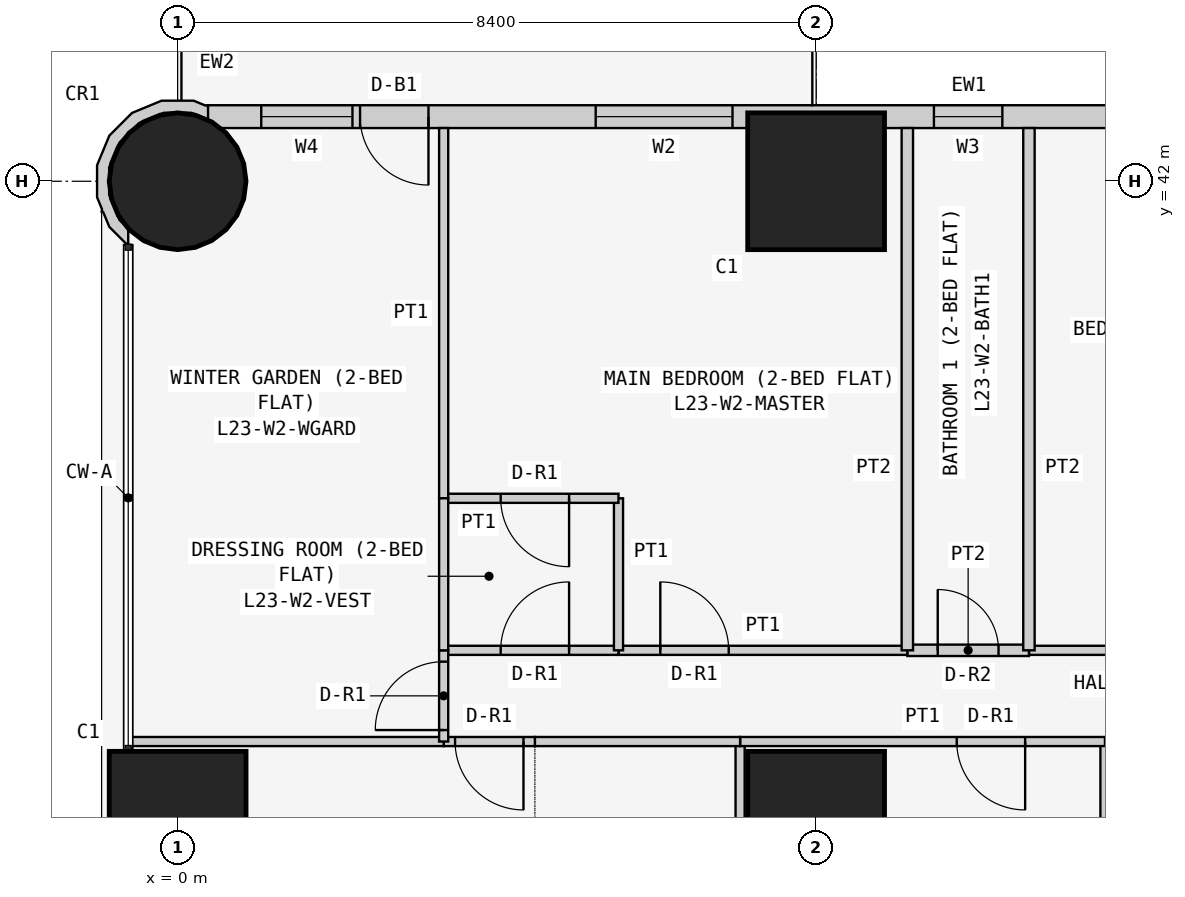
"""IFC4 building model, lengths in metres.
Left out: names, types, materials, properties, quantities, classifications, styles, units other than length and angle.
Written with IfcOpenShell. Run it as: python <this file> out.ifc"""

import sys

from ifc_helpers import new_model, si_unit, direction, frame, frame_2d, origin, origin_2d, place, context, subcontext, project, spatial, polyline, rectangle, circle, outline, extrude, element, fill, save


model = new_model("IFC4")
c1 = context("Model", 3, precision=1e-05, world=origin(), true_north=direction((0.0, 1.0)))
c2 = subcontext(c1, "Body", "Model", "MODEL_VIEW")
j1 = project(units=[si_unit("LENGTHUNIT", "METRE"), si_unit("PLANEANGLEUNIT", "RADIAN")], contexts=[c1])
p1 = place(None, origin())
s1 = spatial("IfcSite", under=j1, at=p1, CompositionType="ELEMENT")
p2 = place(p1, origin())
s2 = spatial("IfcBuilding", under=s1, at=p2, CompositionType="ELEMENT")
p3 = place(p2, frame((0.0, 0.0, 92.1)))
s3 = spatial("IfcBuildingStorey", under=s2, at=p3, CompositionType="ELEMENT", Elevation=92.1)
p4 = place(p3, frame((0.0, 33.6, 0.0), z_axis=(0.0, 0.0, 1.0), x_axis=(1.0, 0.0, 0.0)))
e1 = element("IfcColumn", 1, at=p4, inside=s3, PredefinedType="COLUMN", context=c2, shape_type="SweptSolid", body=[
    extrude(rectangle(XDim=1.8, YDim=1.8, at=origin_2d()), origin(), (0.0, 0.0, 1.0), 3.6),
])
p5 = place(p3, frame((0.0, 42.0, 0.0), z_axis=(0.0, 0.0, 1.0), x_axis=(1.0, 0.0, 0.0)))
e2 = element("IfcColumn", 2, at=p5, inside=s3, PredefinedType="COLUMN", context=c2, shape_type="SweptSolid", body=[
    extrude(circle(Radius=0.9, at=origin_2d()), origin(), (0.0, 0.0, 1.0), 3.6),
])
for number, where, z_axis, x_axis in (
    (3, (8.4, 33.6, 0.0), (0.0, 0.0, 1.0), (1.0, 0.0, 0.0)),
    (4, (8.4, 42.0, 0.0), (0.0, 0.0, 1.0), (1.0, 0.0, 0.0)),
):
    element("IfcColumn", number, at=place(p3, frame(where, z_axis=z_axis, x_axis=x_axis)), inside=s3, PredefinedType="COLUMN", context=c2, shape_type="SweptSolid", body=[
        extrude(rectangle(XDim=1.8, YDim=1.8, at=origin_2d()), origin(), (0.0, 0.0, 1.0), 3.6),
    ])
p6 = place(p3, frame((15.8, 42.85, 0.0), z_axis=(0.0, 0.0, 1.0), x_axis=(-1.0, 0.0, 0.0)))
e5 = element("IfcWall", 5, at=p6, inside=s3, PredefinedType="SOLIDWALL", context=c2, shape_type="SweptSolid", body=[
    extrude(rectangle(XDim=15.4, YDim=0.3, at=frame_2d((7.7, 0.0))), origin(), (0.0, 0.0, 1.0), 3.45),
])
p7 = place(p6, frame((1.2, 0.0, 0.9)))
e6 = element("IfcOpeningElement", 6, at=p7, cuts=e5, PredefinedType="OPENING", context=c2, shape_type="SweptSolid", body=[
    extrude(rectangle(XDim=1.8, YDim=1.5, at=frame_2d((0.9, 0.75))), frame((0.0, 0.16, 0.0), z_axis=(0.0, -1.0, 0.0), x_axis=(1.0, 0.0, 0.0)), (0.0, 0.0, 1.0), 0.32),
])
p8 = place(p6, frame((4.95, 0.0, 1.5)))
e7 = element("IfcOpeningElement", 7, at=p8, cuts=e5, PredefinedType="OPENING", context=c2, shape_type="SweptSolid", body=[
    extrude(rectangle(XDim=0.9, YDim=0.7, at=frame_2d((0.45, 0.35))), frame((0.0, 0.16, 0.0), z_axis=(0.0, -1.0, 0.0), x_axis=(1.0, 0.0, 0.0)), (0.0, 0.0, 1.0), 0.32),
])
p9 = place(p6, frame((8.5, 0.0, 0.9)))
e8 = element("IfcOpeningElement", 8, at=p9, cuts=e5, PredefinedType="OPENING", context=c2, shape_type="SweptSolid", body=[
    extrude(rectangle(XDim=1.8, YDim=1.5, at=frame_2d((0.9, 0.75))), frame((0.0, 0.16, 0.0), z_axis=(0.0, -1.0, 0.0), x_axis=(1.0, 0.0, 0.0)), (0.0, 0.0, 1.0), 0.32),
])
p10 = place(p6, frame((12.5, 0.0, 0.0)))
e9 = element("IfcOpeningElement", 9, at=p10, cuts=e5, PredefinedType="OPENING", context=c2, shape_type="SweptSolid", body=[
    extrude(rectangle(XDim=0.9, YDim=2.4, at=frame_2d((0.45, 1.2))), frame((0.0, 0.16, 0.0), z_axis=(0.0, -1.0, 0.0), x_axis=(1.0, 0.0, 0.0)), (0.0, 0.0, 1.0), 0.32),
])
p11 = place(p6, frame((13.5, 0.0, 0.9)))
e10 = element("IfcOpeningElement", 10, at=p11, cuts=e5, PredefinedType="OPENING", context=c2, shape_type="SweptSolid", body=[
    extrude(rectangle(XDim=1.2, YDim=1.5, at=frame_2d((0.6, 0.75))), frame((0.0, 0.16, 0.0), z_axis=(0.0, -1.0, 0.0), x_axis=(1.0, 0.0, 0.0)), (0.0, 0.0, 1.0), 0.32),
])
p12 = place(p3, frame((0.364, 42.91, 0.0), z_axis=(0.0, 0.0, 1.0), x_axis=(-0.926129809145, 0.377204953059, 0.0)))
e11 = element("IfcWall", 11, at=p12, inside=s3, PredefinedType="SOLIDWALL", context=c2, shape_type="SweptSolid", body=[
    extrude(outline(polyline([(0.36, 1.803), (0.509, 1.741), (0.761, 1.486), (0.896, 1.154), (0.894, 0.795), (0.755, 0.465), (0.5, 0.213), (0.168, 0.078), (-0.1, 0.08), (0.001, -0.097), (0.03, -0.08), (0.199, -0.081), (0.589, 0.078), (0.889, 0.374), (1.053, 0.763), (1.055, 1.185), (0.896, 1.575), (0.778, 1.695), (0.769, 1.728), (0.75, 1.723), (0.6, 1.875), (0.295, 2.003), (0.281, 1.998), (0.36, 1.803)])), origin(), (0.0, 0.0, 1.0), 3.45),
])
for number, where, z_axis, x_axis in (
    (12, (12.2, 29.4, 0.0), (0.0, 0.0, 1.0), (0.0, 1.0, 0.0)),
    (13, (7.4, 29.4, 0.0), (0.0, 0.0, 1.0), (0.0, 1.0, 0.0)),
):
    element("IfcWall", number, at=place(p3, frame(where, z_axis=z_axis, x_axis=x_axis)), inside=s3, PredefinedType="PARTITIONING", context=c2, shape_type="SweptSolid", body=[
        extrude(rectangle(XDim=5.229, YDim=0.12, at=frame_2d((2.615, 0.0))), origin(), (0.0, 0.0, 1.0), 3.45),
    ])
p13 = place(p3, frame((7.4, 34.629, 0.0), z_axis=(0.0, 0.0, 1.0), x_axis=(1.0, 0.0, 0.0)))
e14 = element("IfcWall", 14, at=p13, inside=s3, PredefinedType="PARTITIONING", context=c2, shape_type="SweptSolid", body=[
    extrude(rectangle(XDim=4.8, YDim=0.12, at=frame_2d((2.4, 0.0))), origin(), (0.0, 0.0, 1.0), 3.45),
])
p14 = place(p13, frame((2.85, 0.0, 0.0)))
e15 = element("IfcOpeningElement", 15, at=p14, cuts=e14, PredefinedType="OPENING", context=c2, shape_type="SweptSolid", body=[
    extrude(rectangle(XDim=0.9, YDim=2.1, at=frame_2d((0.45, 1.05))), frame((0.0, 0.07, 0.0), z_axis=(0.0, -1.0, 0.0), x_axis=(1.0, 0.0, 0.0)), (0.0, 0.0, 1.0), 0.14),
])
p15 = place(p3, frame((4.7, 34.629, 0.0), z_axis=(0.0, 0.0, 1.0), x_axis=(1.0, 0.0, 0.0)))
e16 = element("IfcWall", 16, at=p15, inside=s3, PredefinedType="PARTITIONING", context=c2, shape_type="SweptSolid", body=[
    extrude(rectangle(XDim=2.7, YDim=0.12, at=frame_2d((1.35, 0.0))), origin(), (0.0, 0.0, 1.0), 3.45),
])
p16 = place(p3, frame((3.5, 34.629, 0.0), z_axis=(0.0, 0.0, 1.0), x_axis=(1.0, 0.0, 0.0)))
e17 = element("IfcWall", 17, at=p16, inside=s3, PredefinedType="PARTITIONING", context=c2, shape_type="SweptSolid", body=[
    extrude(rectangle(XDim=1.2, YDim=0.12, at=frame_2d((0.6, 0.0))), origin(), (0.0, 0.0, 1.0), 3.45),
])
p17 = place(p16, frame((0.15, 0.0, 0.0)))
e18 = element("IfcOpeningElement", 18, at=p17, cuts=e17, PredefinedType="OPENING", context=c2, shape_type="SweptSolid", body=[
    extrude(rectangle(XDim=0.9, YDim=2.1, at=frame_2d((0.45, 1.05))), frame((0.0, 0.07, 0.0), z_axis=(0.0, -1.0, 0.0), x_axis=(1.0, 0.0, 0.0)), (0.0, 0.0, 1.0), 0.14),
])
p18 = place(p3, frame((-0.65, 34.629, 0.0), z_axis=(0.0, 0.0, 1.0), x_axis=(1.0, 0.0, 0.0)))
e19 = element("IfcWall", 19, at=p18, inside=s3, PredefinedType="PARTITIONING", context=c2, shape_type="SweptSolid", body=[
    extrude(rectangle(XDim=4.15, YDim=0.12, at=frame_2d((2.075, 0.0))), origin(), (0.0, 0.0, 1.0), 3.45),
])
p19 = place(p3, frame((11.2, 35.829, 0.0), z_axis=(0.0, 0.0, 1.0), x_axis=(1.0, 0.0, 0.0)))
e20 = element("IfcWall", 20, at=p19, inside=s3, PredefinedType="PARTITIONING", context=c2, shape_type="SweptSolid", body=[
    extrude(rectangle(XDim=4.575, YDim=0.12, at=frame_2d((2.288, 0.0))), origin(), (0.0, 0.0, 1.0), 3.45),
])
p20 = place(p19, frame((1.85, 0.0, 0.0)))
e21 = element("IfcOpeningElement", 21, at=p20, cuts=e20, PredefinedType="OPENING", context=c2, shape_type="SweptSolid", body=[
    extrude(rectangle(XDim=0.9, YDim=2.1, at=frame_2d((0.45, 1.05))), frame((0.0, 0.07, 0.0), z_axis=(0.0, -1.0, 0.0), x_axis=(1.0, 0.0, 0.0)), (0.0, 0.0, 1.0), 0.14),
])
p21 = place(p3, frame((9.6, 35.829, 0.0), z_axis=(0.0, 0.0, 1.0), x_axis=(1.0, 0.0, 0.0)))
e22 = element("IfcWall", 22, at=p21, inside=s3, PredefinedType="PARTITIONING", context=c2, shape_type="SweptSolid", body=[
    extrude(rectangle(XDim=1.6, YDim=0.15, at=frame_2d((0.8, 0.0))), origin(), (0.0, 0.0, 1.0), 3.45),
])
p22 = place(p21, frame((0.4, 0.0, 0.0)))
e23 = element("IfcOpeningElement", 23, at=p22, cuts=e22, PredefinedType="OPENING", context=c2, shape_type="SweptSolid", body=[
    extrude(rectangle(XDim=0.8, YDim=2.1, at=frame_2d((0.4, 1.05))), frame((0.0, 0.085, 0.0), z_axis=(0.0, -1.0, 0.0), x_axis=(1.0, 0.0, 0.0)), (0.0, 0.0, 1.0), 0.17),
])
p23 = place(p3, frame((5.8, 35.829, 0.0), z_axis=(0.0, 0.0, 1.0), x_axis=(1.0, 0.0, 0.0)))
e24 = element("IfcWall", 24, at=p23, inside=s3, PredefinedType="PARTITIONING", context=c2, shape_type="SweptSolid", body=[
    extrude(rectangle(XDim=3.8, YDim=0.12, at=frame_2d((1.9, 0.0))), origin(), (0.0, 0.0, 1.0), 3.45),
])
p24 = place(p23, frame((0.55, 0.0, 0.0)))
e25 = element("IfcOpeningElement", 25, at=p24, cuts=e24, PredefinedType="OPENING", context=c2, shape_type="SweptSolid", body=[
    extrude(rectangle(XDim=0.9, YDim=2.1, at=frame_2d((0.45, 1.05))), frame((0.0, 0.07, 0.0), z_axis=(0.0, -1.0, 0.0), x_axis=(1.0, 0.0, 0.0)), (0.0, 0.0, 1.0), 0.14),
])
p25 = place(p3, frame((3.5, 35.829, 0.0), z_axis=(0.0, 0.0, 1.0), x_axis=(1.0, 0.0, 0.0)))
e26 = element("IfcWall", 26, at=p25, inside=s3, PredefinedType="PARTITIONING", context=c2, shape_type="SweptSolid", body=[
    extrude(rectangle(XDim=2.3, YDim=0.12, at=frame_2d((1.15, 0.0))), origin(), (0.0, 0.0, 1.0), 3.45),
])
p26 = place(p25, frame((0.75, 0.0, 0.0)))
e27 = element("IfcOpeningElement", 27, at=p26, cuts=e26, PredefinedType="OPENING", context=c2, shape_type="SweptSolid", body=[
    extrude(rectangle(XDim=0.9, YDim=2.1, at=frame_2d((0.45, 1.05))), frame((0.0, 0.07, 0.0), z_axis=(0.0, -1.0, 0.0), x_axis=(1.0, 0.0, 0.0)), (0.0, 0.0, 1.0), 0.14),
])
p27 = place(p3, frame((3.5, 34.629, 0.0), z_axis=(0.0, 0.0, 1.0), x_axis=(0.0, 1.0, 0.0)))
e28 = element("IfcWall", 28, at=p27, inside=s3, PredefinedType="PARTITIONING", context=c2, shape_type="SweptSolid", body=[
    extrude(rectangle(XDim=1.2, YDim=0.12, at=frame_2d((0.6, 0.0))), origin(), (0.0, 0.0, 1.0), 3.45),
])
p28 = place(p27, frame((0.151, 0.0, 0.0)))
e29 = element("IfcOpeningElement", 29, at=p28, cuts=e28, PredefinedType="OPENING", context=c2, shape_type="SweptSolid", body=[
    extrude(rectangle(XDim=0.9, YDim=2.1, at=frame_2d((0.45, 1.05))), frame((0.0, 0.07, 0.0), z_axis=(0.0, -1.0, 0.0), x_axis=(1.0, 0.0, 0.0)), (0.0, 0.0, 1.0), 0.14),
])
for number, where, z_axis, x_axis in (
    (30, (11.2, 35.829, 0.0), (0.0, 0.0, 1.0), (0.0, 1.0, 0.0)),
    (31, (9.6, 35.829, 0.0), (0.0, 0.0, 1.0), (0.0, 1.0, 0.0)),
):
    element("IfcWall", number, at=place(p3, frame(where, z_axis=z_axis, x_axis=x_axis)), inside=s3, PredefinedType="PARTITIONING", context=c2, shape_type="SweptSolid", body=[
        extrude(rectangle(XDim=6.871, YDim=0.15, at=frame_2d((3.436, 0.0))), origin(), (0.0, 0.0, 1.0), 3.45),
    ])
p29 = place(p3, frame((5.8, 35.829, 0.0), z_axis=(0.0, 0.0, 1.0), x_axis=(0.0, 1.0, 0.0)))
e32 = element("IfcWall", 32, at=p29, inside=s3, PredefinedType="PARTITIONING", context=c2, shape_type="SweptSolid", body=[
    extrude(rectangle(XDim=2.0, YDim=0.12, at=frame_2d((1.0, 0.0))), origin(), (0.0, 0.0, 1.0), 3.45),
])
p30 = place(p3, frame((5.8, 37.829, 0.0), z_axis=(0.0, 0.0, 1.0), x_axis=(-1.0, 0.0, 0.0)))
e33 = element("IfcWall", 33, at=p30, inside=s3, PredefinedType="PARTITIONING", context=c2, shape_type="SweptSolid", body=[
    extrude(rectangle(XDim=2.3, YDim=0.12, at=frame_2d((1.15, 0.0))), origin(), (0.0, 0.0, 1.0), 3.45),
])
p31 = place(p30, frame((0.65, 0.0, 0.0)))
e34 = element("IfcOpeningElement", 34, at=p31, cuts=e33, PredefinedType="OPENING", context=c2, shape_type="SweptSolid", body=[
    extrude(rectangle(XDim=0.9, YDim=2.1, at=frame_2d((0.45, 1.05))), frame((0.0, 0.07, 0.0), z_axis=(0.0, -1.0, 0.0), x_axis=(1.0, 0.0, 0.0)), (0.0, 0.0, 1.0), 0.14),
])
p32 = place(p3, frame((3.5, 37.829, 0.0), z_axis=(0.0, 0.0, 1.0), x_axis=(0.0, 1.0, 0.0)))
e35 = element("IfcWall", 35, at=p32, inside=s3, PredefinedType="PARTITIONING", context=c2, shape_type="SweptSolid", body=[
    extrude(rectangle(XDim=4.871, YDim=0.12, at=frame_2d((2.436, 0.0))), origin(), (0.0, 0.0, 1.0), 3.45),
])
p33 = place(p3, frame((3.5, 35.829, 0.0), z_axis=(0.0, 0.0, 1.0), x_axis=(0.0, 1.0, 0.0)))
e36 = element("IfcWall", 36, at=p33, inside=s3, PredefinedType="PARTITIONING", context=c2, shape_type="SweptSolid", body=[
    extrude(rectangle(XDim=2.0, YDim=0.12, at=frame_2d((1.0, 0.0))), origin(), (0.0, 0.0, 1.0), 3.45),
])
p34 = place(p8, origin())
e37 = element("IfcWindow", 37, at=p34, inside=s3, PartitioningType="SINGLE_PANEL", PredefinedType="WINDOW", context=c2, shape_type="SweptSolid", body=[
    extrude(rectangle(XDim=0.9, YDim=0.7, at=frame_2d((0.45, 0.35))), frame((0.0, 0.03, 0.0), z_axis=(0.0, -1.0, 0.0), x_axis=(1.0, 0.0, 0.0)), (0.0, 0.0, 1.0), 0.06),
])
fill(e7, e37)
p35 = place(p9, origin())
e38 = element("IfcWindow", 38, at=p35, inside=s3, PartitioningType="SINGLE_PANEL", PredefinedType="WINDOW", context=c2, shape_type="SweptSolid", body=[
    extrude(rectangle(XDim=1.8, YDim=1.5, at=frame_2d((0.9, 0.75))), frame((0.0, 0.03, 0.0), z_axis=(0.0, -1.0, 0.0), x_axis=(1.0, 0.0, 0.0)), (0.0, 0.0, 1.0), 0.06),
])
fill(e8, e38)
p36 = place(p10, origin())
e39 = element("IfcDoor", 39, at=p36, inside=s3, OperationType="SINGLE_SWING_LEFT", PredefinedType="DOOR", context=c2, shape_type="SweptSolid", body=[
    extrude(rectangle(XDim=0.9, YDim=2.4, at=frame_2d((0.45, 1.2))), frame((0.0, 0.025, 0.0), z_axis=(0.0, -1.0, 0.0), x_axis=(1.0, 0.0, 0.0)), (0.0, 0.0, 1.0), 0.05),
])
fill(e9, e39)
p37 = place(p11, origin())
e40 = element("IfcWindow", 40, at=p37, inside=s3, PartitioningType="SINGLE_PANEL", PredefinedType="WINDOW", context=c2, shape_type="SweptSolid", body=[
    extrude(rectangle(XDim=1.2, YDim=1.5, at=frame_2d((0.6, 0.75))), frame((0.0, 0.03, 0.0), z_axis=(0.0, -1.0, 0.0), x_axis=(1.0, 0.0, 0.0)), (0.0, 0.0, 1.0), 0.06),
])
fill(e10, e40)
p38 = place(p14, frame((0.9, 0.0, 0.0), z_axis=(0.0, 0.0, 1.0), x_axis=(-1.0, 0.0, 0.0)))
e41 = element("IfcDoor", 41, at=p38, inside=s3, OperationType="SINGLE_SWING_LEFT", PredefinedType="DOOR", context=c2, shape_type="SweptSolid", body=[
    extrude(rectangle(XDim=0.9, YDim=2.1, at=frame_2d((0.45, 1.05))), frame((0.0, 0.025, 0.0), z_axis=(0.0, -1.0, 0.0), x_axis=(1.0, 0.0, 0.0)), (0.0, 0.0, 1.0), 0.05),
])
fill(e15, e41)
p39 = place(p17, frame((0.9, 0.0, 0.0), z_axis=(0.0, 0.0, 1.0), x_axis=(-1.0, 0.0, 0.0)))
e42 = element("IfcDoor", 42, at=p39, inside=s3, OperationType="SINGLE_SWING_LEFT", PredefinedType="DOOR", context=c2, shape_type="SweptSolid", body=[
    extrude(rectangle(XDim=0.9, YDim=2.1, at=frame_2d((0.45, 1.05))), frame((0.0, 0.025, 0.0), z_axis=(0.0, -1.0, 0.0), x_axis=(1.0, 0.0, 0.0)), (0.0, 0.0, 1.0), 0.05),
])
fill(e18, e42)
p40 = place(p22, origin())
e43 = element("IfcDoor", 43, at=p40, inside=s3, OperationType="SINGLE_SWING_LEFT", PredefinedType="DOOR", context=c2, shape_type="SweptSolid", body=[
    extrude(rectangle(XDim=0.8, YDim=2.1, at=frame_2d((0.4, 1.05))), frame((0.0, 0.025, 0.0), z_axis=(0.0, -1.0, 0.0), x_axis=(1.0, 0.0, 0.0)), (0.0, 0.0, 1.0), 0.05),
])
fill(e23, e43)
p41 = place(p24, origin())
e44 = element("IfcDoor", 44, at=p41, inside=s3, OperationType="SINGLE_SWING_LEFT", PredefinedType="DOOR", context=c2, shape_type="SweptSolid", body=[
    extrude(rectangle(XDim=0.9, YDim=2.1, at=frame_2d((0.45, 1.05))), frame((0.0, 0.025, 0.0), z_axis=(0.0, -1.0, 0.0), x_axis=(1.0, 0.0, 0.0)), (0.0, 0.0, 1.0), 0.05),
])
fill(e25, e44)
p42 = place(p26, origin())
e45 = element("IfcDoor", 45, at=p42, inside=s3, OperationType="SINGLE_SWING_RIGHT", PredefinedType="DOOR", context=c2, shape_type="SweptSolid", body=[
    extrude(rectangle(XDim=0.9, YDim=2.1, at=frame_2d((0.45, 1.05))), frame((0.0, 0.025, 0.0), z_axis=(0.0, -1.0, 0.0), x_axis=(1.0, 0.0, 0.0)), (0.0, 0.0, 1.0), 0.05),
])
fill(e27, e45)
p43 = place(p31, origin())
e46 = element("IfcDoor", 46, at=p43, inside=s3, OperationType="SINGLE_SWING_LEFT", PredefinedType="DOOR", context=c2, shape_type="SweptSolid", body=[
    extrude(rectangle(XDim=0.9, YDim=2.1, at=frame_2d((0.45, 1.05))), frame((0.0, 0.025, 0.0), z_axis=(0.0, -1.0, 0.0), x_axis=(1.0, 0.0, 0.0)), (0.0, 0.0, 1.0), 0.05),
])
fill(e34, e46)
p44 = place(p28, origin())
e47 = element("IfcDoor", 47, at=p44, inside=s3, OperationType="SINGLE_SWING_LEFT", PredefinedType="DOOR", context=c2, shape_type="SweptSolid", body=[
    extrude(rectangle(XDim=0.9, YDim=2.1, at=frame_2d((0.45, 1.05))), frame((0.0, 0.025, 0.0), z_axis=(0.0, -1.0, 0.0), x_axis=(1.0, 0.0, 0.0)), (0.0, 0.0, 1.0), 0.05),
])
fill(e29, e47)
save(model, sys.argv[1])
